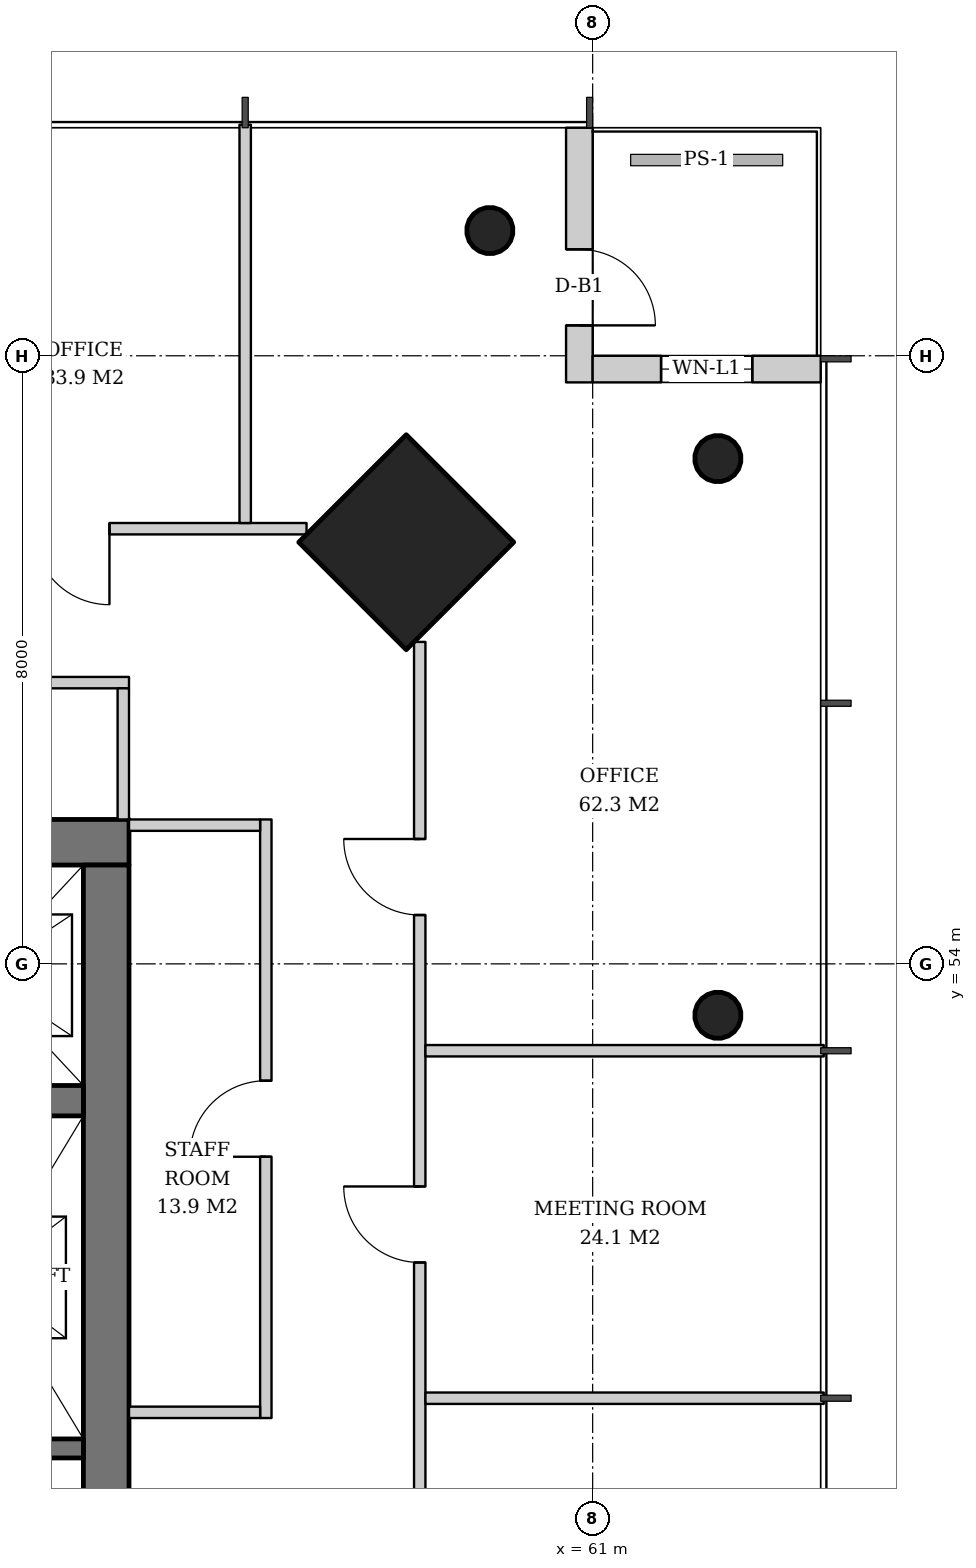
"""IFC4 building model, lengths in metres.
Left out: names, types, materials, properties, quantities, classifications, styles, units other than length and angle.
Written with IfcOpenShell. Run it as: python <this file> out.ifc"""

import sys

from ifc_helpers import new_model, si_unit, direction, frame, frame_2d, origin, origin_2d, place, context, subcontext, project, spatial, rectangle, hollow_circle, extrude, element, fill, save


model = new_model("IFC4")
c1 = context("Model", 3, precision=1e-05, world=origin(), true_north=direction((0.0, 1.0)))
c2 = subcontext(c1, "Body", "Model", "MODEL_VIEW")
j1 = project(units=[si_unit("LENGTHUNIT", "METRE"), si_unit("PLANEANGLEUNIT", "RADIAN")], contexts=[c1])
p1 = place(None, origin())
s1 = spatial("IfcSite", under=j1, at=p1, CompositionType="ELEMENT")
p2 = place(p1, origin())
s2 = spatial("IfcBuilding", under=s1, at=p2, CompositionType="ELEMENT")
p3 = place(p2, frame((0.0, 0.0, 218.6)))
s3 = spatial("IfcBuildingStorey", under=s2, at=p3, CompositionType="ELEMENT", Elevation=218.6)
p4 = place(p3, frame((58.586, 59.586, 0.0), z_axis=(-0.031900153262, -0.031900153262, 0.998981861919), x_axis=(0.707106781187, -0.707106781187, 0.0)))
e1 = element("IfcColumn", 1, at=p4, inside=s3, PredefinedType="COLUMN", context=c2, shape_type="SweptSolid", body=[
    extrude(rectangle(XDim=2.0, YDim=2.0, at=origin_2d()), origin(), (0.0, 0.0, 1.0), 3.804),
])
p5 = place(p3, frame((62.686, 60.686, 0.0), z_axis=(-0.031964207655, -0.031964207655, 0.998977766949), x_axis=(0.707106781187, -0.707106781187, 0.0)))
e2 = element("IfcColumn", 2, at=p5, inside=s3, PredefinedType="COLUMN", context=c2, shape_type="SweptSolid", body=[
    extrude(hollow_circle(Radius=0.305, WallThickness=0.025, at=origin_2d()), origin(), (0.0, 0.0, 1.0), 3.804),
])
p6 = place(p3, frame((62.686, 53.343, 0.0), z_axis=(-0.031976494272, -0.015924037308, 0.99936176075), x_axis=(0.445775033553, -0.895145027055, 0.0)))
e3 = element("IfcColumn", 3, at=p6, inside=s3, PredefinedType="COLUMN", context=c2, shape_type="SweptSolid", body=[
    extrude(hollow_circle(Radius=0.305, WallThickness=0.025, at=origin_2d()), origin(), (0.0, 0.0, 1.0), 3.802),
])
p7 = place(p3, frame((59.686, 63.686, 0.0), z_axis=(-0.031964207655, -0.031964207655, 0.998977766949), x_axis=(0.707106781187, -0.707106781187, 0.0)))
e4 = element("IfcColumn", 4, at=p7, inside=s3, PredefinedType="COLUMN", context=c2, shape_type="SweptSolid", body=[
    extrude(hollow_circle(Radius=0.305, WallThickness=0.025, at=origin_2d()), origin(), (0.0, 0.0, 1.0), 3.804),
])
p8 = place(p3, frame((35.1, 55.6, 0.0), z_axis=(0.0, 0.0, 1.0), x_axis=(1.0, 0.0, 0.0)))
e5 = element("IfcWall", 5, at=p8, inside=s3, PredefinedType="SHEAR", context=c2, shape_type="SweptSolid", body=[
    extrude(rectangle(XDim=19.8, YDim=0.6, at=frame_2d((9.9, 0.0))), origin(), (0.0, 0.0, 1.0), 3.8),
])
p9 = place(p8, frame((14.54, 0.0, 0.0)))
e6 = element("IfcOpeningElement", 6, at=p9, cuts=e5, PredefinedType="OPENING", context=c2, shape_type="SweptSolid", body=[
    extrude(rectangle(XDim=1.0, YDim=2.1, at=frame_2d((0.5, 1.05))), frame((0.0, 0.31, 0.0), z_axis=(0.0, -1.0, 0.0), x_axis=(1.0, 0.0, 0.0)), (0.0, 0.0, 1.0), 0.62),
])
p10 = place(p8, frame((0.85, 0.0, 0.0)))
e7 = element("IfcOpeningElement", 7, at=p10, cuts=e5, PredefinedType="OPENING", context=c2, shape_type="SweptSolid", body=[
    extrude(rectangle(XDim=1.0, YDim=2.1, at=frame_2d((0.5, 1.05))), frame((0.0, 0.31, 0.0), z_axis=(0.0, -1.0, 0.0), x_axis=(1.0, 0.0, 0.0)), (0.0, 0.0, 1.0), 0.62),
])
p11 = place(p8, frame((2.425, 0.0, 0.0)))
e8 = element("IfcOpeningElement", 8, at=p11, cuts=e5, PredefinedType="OPENING", context=c2, shape_type="SweptSolid", body=[
    extrude(rectangle(XDim=1.0, YDim=2.1, at=frame_2d((0.5, 1.05))), frame((0.0, 0.31, 0.0), z_axis=(0.0, -1.0, 0.0), x_axis=(1.0, 0.0, 0.0)), (0.0, 0.0, 1.0), 0.62),
])
p12 = place(p8, frame((4.012, 0.0, 0.0)))
e9 = element("IfcOpeningElement", 9, at=p12, cuts=e5, PredefinedType="OPENING", context=c2, shape_type="SweptSolid", body=[
    extrude(rectangle(XDim=1.0, YDim=2.1, at=frame_2d((0.5, 1.05))), frame((0.0, 0.31, 0.0), z_axis=(0.0, -1.0, 0.0), x_axis=(1.0, 0.0, 0.0)), (0.0, 0.0, 1.0), 0.62),
])
p13 = place(p3, frame((54.6, 36.7, 0.0), z_axis=(0.0, 0.0, 1.0), x_axis=(0.0, 1.0, 0.0)))
e10 = element("IfcWall", 10, at=p13, inside=s3, PredefinedType="SHEAR", context=c2, shape_type="SweptSolid", body=[
    extrude(rectangle(XDim=18.6, YDim=0.6, at=frame_2d((9.3, 0.0))), origin(), (0.0, 0.0, 1.0), 3.8),
])
p14 = place(p13, frame((8.4, 0.0, 0.0)))
e11 = element("IfcOpeningElement", 11, at=p14, cuts=e10, PredefinedType="OPENING", context=c2, shape_type="SweptSolid", body=[
    extrude(rectangle(XDim=1.8, YDim=2.4, at=frame_2d((0.9, 1.2))), frame((0.0, 0.31, 0.0), z_axis=(0.0, -1.0, 0.0), x_axis=(1.0, 0.0, 0.0)), (0.0, 0.0, 1.0), 0.62),
])
p15 = place(p3, frame((35.7, 52.2, 0.0), z_axis=(0.0, 0.0, 1.0), x_axis=(1.0, 0.0, 0.0)))
e12 = element("IfcWall", 12, at=p15, inside=s3, PredefinedType="SHEAR", context=c2, shape_type="SweptSolid", body=[
    extrude(rectangle(XDim=18.6, YDim=0.4, at=frame_2d((9.3, 0.0))), origin(), (0.0, 0.0, 1.0), 3.8),
])
p16 = place(p3, frame((60.825, 65.0, 0.0), z_axis=(0.0, 0.0, 1.0), x_axis=(0.0, -1.0, 0.0)))
e13 = element("IfcWall", 13, at=p16, inside=s3, PredefinedType="SOLIDWALL", context=c2, shape_type="SweptSolid", body=[
    extrude(rectangle(XDim=3.35, YDim=0.35, at=frame_2d((1.675, 0.0))), origin(), (0.0, 0.0, 1.0), 3.62),
])
p17 = place(p16, frame((1.6, 0.0, 0.0)))
e14 = element("IfcOpeningElement", 14, at=p17, cuts=e13, PredefinedType="OPENING", context=c2, shape_type="SweptSolid", body=[
    extrude(rectangle(XDim=1.0, YDim=2.4, at=frame_2d((0.5, 1.2))), frame((0.0, 0.185, 0.0), z_axis=(0.0, -1.0, 0.0), x_axis=(1.0, 0.0, 0.0)), (0.0, 0.0, 1.0), 0.37),
])
p18 = place(p3, frame((61.0, 61.825, 0.0), z_axis=(0.0, 0.0, 1.0), x_axis=(1.0, 0.0, 0.0)))
e15 = element("IfcWall", 15, at=p18, inside=s3, PredefinedType="SOLIDWALL", context=c2, shape_type="SweptSolid", body=[
    extrude(rectangle(XDim=3.0, YDim=0.35, at=frame_2d((1.5, 0.0))), origin(), (0.0, 0.0, 1.0), 3.62),
])
p19 = place(p18, frame((0.9, 0.0, 0.6)))
e16 = element("IfcOpeningElement", 16, at=p19, cuts=e15, PredefinedType="OPENING", context=c2, shape_type="SweptSolid", body=[
    extrude(rectangle(XDim=1.2, YDim=2.55, at=frame_2d((0.6, 1.275))), frame((0.0, 0.185, 0.0), z_axis=(0.0, -1.0, 0.0), x_axis=(1.0, 0.0, 0.0)), (0.0, 0.0, 1.0), 0.37),
])
p20 = place(p3, frame((48.93, 47.625, 0.0), z_axis=(0.0, 0.0, 1.0), x_axis=(1.0, 0.0, 0.0)))
e17 = element("IfcWall", 17, at=p20, inside=s3, PredefinedType="SHEAR", context=c2, shape_type="SweptSolid", body=[
    extrude(rectangle(XDim=5.37, YDim=0.25, at=frame_2d((2.685, 0.0))), origin(), (0.0, 0.0, 1.0), 3.8),
])
p21 = place(p3, frame((56.7, 48.025, 0.0), z_axis=(0.0, 0.0, 1.0), x_axis=(0.0, 1.0, 0.0)))
e18 = element("IfcWall", 18, at=p21, inside=s3, PredefinedType="PARTITIONING", context=c2, shape_type="SweptSolid", body=[
    extrude(rectangle(XDim=7.875, YDim=0.15, at=frame_2d((3.938, 0.0))), origin(), (0.0, 0.0, 1.0), 2.867),
])
p22 = place(p21, frame((3.438, 0.0, 0.0)))
e19 = element("IfcOpeningElement", 19, at=p22, cuts=e18, PredefinedType="OPENING", context=c2, shape_type="SweptSolid", body=[
    extrude(rectangle(XDim=1.0, YDim=2.1, at=frame_2d((0.5, 1.05))), frame((0.0, 0.085, 0.0), z_axis=(0.0, -1.0, 0.0), x_axis=(1.0, 0.0, 0.0)), (0.0, 0.0, 1.0), 0.17),
])
for number, where, z_axis, x_axis in (
    (20, (54.9, 48.1, 0.0), (0.0, 0.0, 1.0), (1.0, 0.0, 0.0)),
    (21, (54.9, 55.825, 0.0), (0.0, 0.0, 1.0), (1.0, 0.0, 0.0)),
):
    element("IfcWall", number, at=place(p3, frame(where, z_axis=z_axis, x_axis=x_axis)), inside=s3, PredefinedType="PARTITIONING", context=c2, shape_type="SweptSolid", body=[
        extrude(rectangle(XDim=1.725, YDim=0.15, at=frame_2d((0.863, 0.0))), origin(), (0.0, 0.0, 1.0), 3.62),
    ])
p23 = place(p3, frame((54.9, 57.7, 0.0), z_axis=(0.0, 0.0, 1.0), x_axis=(-1.0, 0.0, 0.0)))
e22 = element("IfcWall", 22, at=p23, inside=s3, PredefinedType="PARTITIONING", context=c2, shape_type="SweptSolid", body=[
    extrude(rectangle(XDim=3.135, YDim=0.15, at=frame_2d((1.567, 0.0))), origin(), (0.0, 0.0, 1.0), 2.92),
])
p24 = place(p23, frame((1.067, 0.0, 0.0)))
e23 = element("IfcOpeningElement", 23, at=p24, cuts=e22, PredefinedType="OPENING", context=c2, shape_type="SweptSolid", body=[
    extrude(rectangle(XDim=1.0, YDim=2.1, at=frame_2d((0.5, 1.05))), frame((0.0, 0.085, 0.0), z_axis=(0.0, -1.0, 0.0), x_axis=(1.0, 0.0, 0.0)), (0.0, 0.0, 1.0), 0.17),
])
p25 = place(p3, frame((54.825, 55.9, 0.0), z_axis=(0.0, 0.0, 1.0), x_axis=(0.0, 1.0, 0.0)))
e24 = element("IfcWall", 24, at=p25, inside=s3, PredefinedType="PARTITIONING", context=c2, shape_type="SweptSolid", body=[
    extrude(rectangle(XDim=1.725, YDim=0.15, at=frame_2d((0.863, 0.0))), origin(), (0.0, 0.0, 1.0), 2.92),
])
p26 = place(p3, frame((58.725, 33.764, 0.0), z_axis=(0.0, 0.0, 1.0), x_axis=(0.0, 1.0, 0.0)))
e25 = element("IfcWall", 25, at=p26, inside=s3, PredefinedType="PARTITIONING", context=c2, shape_type="SweptSolid", body=[
    extrude(rectangle(XDim=24.472, YDim=0.15, at=frame_2d((12.236, 0.0))), origin(), (0.0, 0.0, 1.0), 2.867),
])
p27 = place(p26, frame((2.593, 0.0, 0.0)))
e26 = element("IfcOpeningElement", 26, at=p27, cuts=e25, PredefinedType="OPENING", context=c2, shape_type="SweptSolid", body=[
    extrude(rectangle(XDim=1.0, YDim=2.1, at=frame_2d((0.5, 1.05))), frame((0.0, 0.085, 0.0), z_axis=(0.0, -1.0, 0.0), x_axis=(1.0, 0.0, 0.0)), (0.0, 0.0, 1.0), 0.17),
])
p28 = place(p26, frame((7.164, 0.0, 0.0)))
e27 = element("IfcOpeningElement", 27, at=p28, cuts=e25, PredefinedType="OPENING", context=c2, shape_type="SweptSolid", body=[
    extrude(rectangle(XDim=1.0, YDim=2.1, at=frame_2d((0.5, 1.05))), frame((0.0, 0.085, 0.0), z_axis=(0.0, -1.0, 0.0), x_axis=(1.0, 0.0, 0.0)), (0.0, 0.0, 1.0), 0.17),
])
p29 = place(p26, frame((11.736, 0.0, 0.0)))
e28 = element("IfcOpeningElement", 28, at=p29, cuts=e25, PredefinedType="OPENING", context=c2, shape_type="SweptSolid", body=[
    extrude(rectangle(XDim=1.0, YDim=2.1, at=frame_2d((0.5, 1.05))), frame((0.0, 0.085, 0.0), z_axis=(0.0, -1.0, 0.0), x_axis=(1.0, 0.0, 0.0)), (0.0, 0.0, 1.0), 0.17),
])
p30 = place(p26, frame((16.307, 0.0, 0.0)))
e29 = element("IfcOpeningElement", 29, at=p30, cuts=e25, PredefinedType="OPENING", context=c2, shape_type="SweptSolid", body=[
    extrude(rectangle(XDim=1.0, YDim=2.1, at=frame_2d((0.5, 1.05))), frame((0.0, 0.085, 0.0), z_axis=(0.0, -1.0, 0.0), x_axis=(1.0, 0.0, 0.0)), (0.0, 0.0, 1.0), 0.17),
])
p31 = place(p26, frame((20.879, 0.0, 0.0)))
e30 = element("IfcOpeningElement", 30, at=p31, cuts=e25, PredefinedType="OPENING", context=c2, shape_type="SweptSolid", body=[
    extrude(rectangle(XDim=1.0, YDim=2.1, at=frame_2d((0.5, 1.05))), frame((0.0, 0.085, 0.0), z_axis=(0.0, -1.0, 0.0), x_axis=(1.0, 0.0, 0.0)), (0.0, 0.0, 1.0), 0.17),
])
for number, where, z_axis, x_axis in (
    (31, (58.8, 48.286, 0.0), (0.0, 0.0, 1.0), (1.0, 0.0, 0.0)),
    (32, (58.8, 52.857, 0.0), (0.0, 0.0, 1.0), (1.0, 0.0, 0.0)),
):
    element("IfcWall", number, at=place(p3, frame(where, z_axis=z_axis, x_axis=x_axis)), inside=s3, PredefinedType="PARTITIONING", context=c2, shape_type="SweptSolid", body=[
        extrude(rectangle(XDim=5.24, YDim=0.15, at=frame_2d((2.62, 0.0))), origin(), (0.0, 0.0, 1.0), 3.12),
    ])
p32 = place(p3, frame((57.236, 59.725, 0.0), z_axis=(0.0, 0.0, 1.0), x_axis=(-1.0, 0.0, 0.0)))
e33 = element("IfcWall", 33, at=p32, inside=s3, PredefinedType="PARTITIONING", context=c2, shape_type="SweptSolid", body=[
    extrude(rectangle(XDim=24.472, YDim=0.15, at=frame_2d((12.236, 0.0))), origin(), (0.0, 0.0, 1.0), 2.867),
])
p33 = place(p32, frame((2.593, 0.0, 0.0)))
e34 = element("IfcOpeningElement", 34, at=p33, cuts=e33, PredefinedType="OPENING", context=c2, shape_type="SweptSolid", body=[
    extrude(rectangle(XDim=1.0, YDim=2.1, at=frame_2d((0.5, 1.05))), frame((0.0, 0.085, 0.0), z_axis=(0.0, -1.0, 0.0), x_axis=(1.0, 0.0, 0.0)), (0.0, 0.0, 1.0), 0.17),
])
p34 = place(p32, frame((7.164, 0.0, 0.0)))
e35 = element("IfcOpeningElement", 35, at=p34, cuts=e33, PredefinedType="OPENING", context=c2, shape_type="SweptSolid", body=[
    extrude(rectangle(XDim=1.0, YDim=2.1, at=frame_2d((0.5, 1.05))), frame((0.0, 0.085, 0.0), z_axis=(0.0, -1.0, 0.0), x_axis=(1.0, 0.0, 0.0)), (0.0, 0.0, 1.0), 0.17),
])
p35 = place(p32, frame((11.736, 0.0, 0.0)))
e36 = element("IfcOpeningElement", 36, at=p35, cuts=e33, PredefinedType="OPENING", context=c2, shape_type="SweptSolid", body=[
    extrude(rectangle(XDim=1.0, YDim=2.1, at=frame_2d((0.5, 1.05))), frame((0.0, 0.085, 0.0), z_axis=(0.0, -1.0, 0.0), x_axis=(1.0, 0.0, 0.0)), (0.0, 0.0, 1.0), 0.17),
])
p36 = place(p32, frame((16.307, 0.0, 0.0)))
e37 = element("IfcOpeningElement", 37, at=p36, cuts=e33, PredefinedType="OPENING", context=c2, shape_type="SweptSolid", body=[
    extrude(rectangle(XDim=1.0, YDim=2.1, at=frame_2d((0.5, 1.05))), frame((0.0, 0.085, 0.0), z_axis=(0.0, -1.0, 0.0), x_axis=(1.0, 0.0, 0.0)), (0.0, 0.0, 1.0), 0.17),
])
p37 = place(p32, frame((20.879, 0.0, 0.0)))
e38 = element("IfcOpeningElement", 38, at=p37, cuts=e33, PredefinedType="OPENING", context=c2, shape_type="SweptSolid", body=[
    extrude(rectangle(XDim=1.0, YDim=2.1, at=frame_2d((0.5, 1.05))), frame((0.0, 0.085, 0.0), z_axis=(0.0, -1.0, 0.0), x_axis=(1.0, 0.0, 0.0)), (0.0, 0.0, 1.0), 0.17),
])
p38 = place(p3, frame((56.428, 59.8, 0.0), z_axis=(0.0, 0.0, 1.0), x_axis=(0.0, 1.0, 0.0)))
e39 = element("IfcWall", 39, at=p38, inside=s3, PredefinedType="PARTITIONING", context=c2, shape_type="SweptSolid", body=[
    extrude(rectangle(XDim=5.24, YDim=0.15, at=frame_2d((2.62, 0.0))), origin(), (0.0, 0.0, 1.0), 3.12),
])
p39 = place(p17, origin())
e40 = element("IfcDoor", 40, at=p39, inside=s3, OperationType="SINGLE_SWING_RIGHT", PredefinedType="DOOR", context=c2, shape_type="SweptSolid", body=[
    extrude(rectangle(XDim=1.0, YDim=2.4, at=frame_2d((0.5, 1.2))), frame((0.0, 0.025, 0.0), z_axis=(0.0, -1.0, 0.0), x_axis=(1.0, 0.0, 0.0)), (0.0, 0.0, 1.0), 0.05),
])
fill(e14, e40)
p40 = place(p19, origin())
e41 = element("IfcWindow", 41, at=p40, inside=s3, PartitioningType="SINGLE_PANEL", PredefinedType="WINDOW", context=c2, shape_type="SweptSolid", body=[
    extrude(rectangle(XDim=1.2, YDim=2.55, at=frame_2d((0.6, 1.275))), frame((0.0, 0.03, 0.0), z_axis=(0.0, -1.0, 0.0), x_axis=(1.0, 0.0, 0.0)), (0.0, 0.0, 1.0), 0.06),
])
fill(e16, e41)
p41 = place(p22, origin())
e42 = element("IfcDoor", 42, at=p41, inside=s3, OperationType="SINGLE_SWING_LEFT", PredefinedType="DOOR", context=c2, shape_type="SweptSolid", body=[
    extrude(rectangle(XDim=1.0, YDim=2.1, at=frame_2d((0.5, 1.05))), frame((0.0, 0.025, 0.0), z_axis=(0.0, -1.0, 0.0), x_axis=(1.0, 0.0, 0.0)), (0.0, 0.0, 1.0), 0.05),
])
fill(e19, e42)
p42 = place(p30, origin())
e43 = element("IfcDoor", 43, at=p42, inside=s3, OperationType="SINGLE_SWING_RIGHT", PredefinedType="DOOR", context=c2, shape_type="SweptSolid", body=[
    extrude(rectangle(XDim=1.0, YDim=2.1, at=frame_2d((0.5, 1.05))), frame((0.0, 0.025, 0.0), z_axis=(0.0, -1.0, 0.0), x_axis=(1.0, 0.0, 0.0)), (0.0, 0.0, 1.0), 0.05),
])
fill(e29, e43)
p43 = place(p31, origin())
e44 = element("IfcDoor", 44, at=p43, inside=s3, OperationType="SINGLE_SWING_RIGHT", PredefinedType="DOOR", context=c2, shape_type="SweptSolid", body=[
    extrude(rectangle(XDim=1.0, YDim=2.1, at=frame_2d((0.5, 1.05))), frame((0.0, 0.025, 0.0), z_axis=(0.0, -1.0, 0.0), x_axis=(1.0, 0.0, 0.0)), (0.0, 0.0, 1.0), 0.05),
])
fill(e30, e44)
p44 = place(p33, origin())
e45 = element("IfcDoor", 45, at=p44, inside=s3, OperationType="SINGLE_SWING_LEFT", PredefinedType="DOOR", context=c2, shape_type="SweptSolid", body=[
    extrude(rectangle(XDim=1.0, YDim=2.1, at=frame_2d((0.5, 1.05))), frame((0.0, 0.025, 0.0), z_axis=(0.0, -1.0, 0.0), x_axis=(1.0, 0.0, 0.0)), (0.0, 0.0, 1.0), 0.05),
])
fill(e34, e45)
save(model, sys.argv[1])
